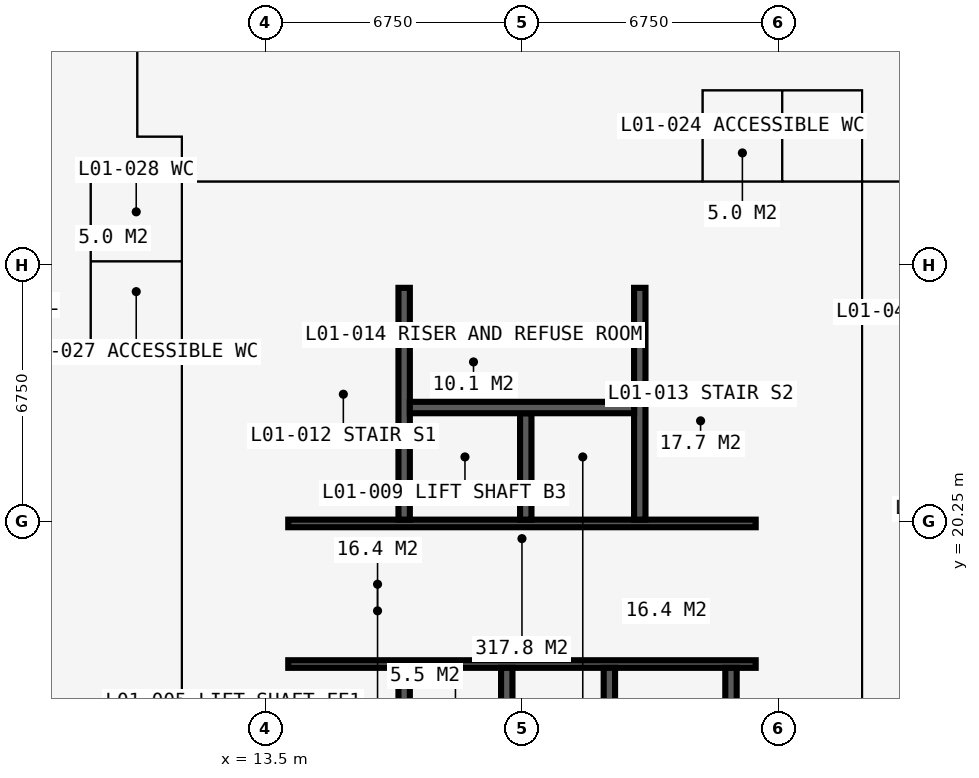
"""IFC4 building model, lengths in metres.
Left out: names, types, materials, properties, quantities, classifications, styles, units other than length and angle.
Written with IfcOpenShell. Run it as: python <this file> out.ifc"""

import sys

from ifc_helpers import new_model, si_unit, direction, frame, frame_2d, origin, place, context, subcontext, project, spatial, rectangle, extrude, element, fill, save


model = new_model("IFC4")
c1 = context("Model", 3, precision=1e-05, world=origin(), true_north=direction((0.0, 1.0)))
c2 = subcontext(c1, "Body", "Model", "MODEL_VIEW")
j1 = project(units=[si_unit("LENGTHUNIT", "METRE"), si_unit("PLANEANGLEUNIT", "RADIAN")], contexts=[c1])
p1 = place(None, origin())
s1 = spatial("IfcSite", under=j1, at=p1, CompositionType="ELEMENT")
p2 = place(p1, origin())
s2 = spatial("IfcBuilding", under=s1, at=p2, CompositionType="ELEMENT")
p3 = place(p2, frame((0.0, 0.0, 4.5)))
s3 = spatial("IfcBuildingStorey", under=s2, at=p3, CompositionType="ELEMENT", Elevation=4.5)
p4 = place(p3, frame((27.0, 14.1, 0.0), z_axis=(0.0, 0.0, 1.0), x_axis=(0.0, 1.0, 0.0)))
e1 = element("IfcWall", 1, at=p4, inside=s3, PredefinedType="SHEAR", context=c2, shape_type="SweptSolid", body=[
    extrude(rectangle(XDim=12.3, YDim=1.2, at=frame_2d((6.15, 0.0))), origin(), (0.0, 0.0, 1.0), 4.5),
])
p5 = place(p4, frame((3.65, 0.0, 0.0)))
e2 = element("IfcOpeningElement", 2, at=p5, cuts=e1, PredefinedType="OPENING", context=c2, shape_type="SweptSolid", body=[
    extrude(rectangle(XDim=1.2, YDim=2.2, at=frame_2d((0.6, 1.1))), frame((0.0, 0.61, 0.0), z_axis=(0.0, -1.0, 0.0), x_axis=(1.0, 0.0, 0.0)), (0.0, 0.0, 1.0), 1.22),
])
p6 = place(p3, frame((27.6, 27.0, 0.0), z_axis=(0.0, 0.0, 1.0), x_axis=(-1.0, 0.0, 0.0)))
e3 = element("IfcWall", 3, at=p6, inside=s3, PredefinedType="SHEAR", context=c2, shape_type="SweptSolid", body=[
    extrude(rectangle(XDim=14.7, YDim=1.2, at=frame_2d((7.35, 0.0))), origin(), (0.0, 0.0, 1.0), 4.5),
])
p7 = place(p6, frame((4.55, 0.0, 0.0)))
e4 = element("IfcOpeningElement", 4, at=p7, cuts=e3, PredefinedType="OPENING", context=c2, shape_type="SweptSolid", body=[
    extrude(rectangle(XDim=0.9, YDim=2.2, at=frame_2d((0.45, 1.1))), frame((0.0, 0.61, 0.0), z_axis=(0.0, -1.0, 0.0), x_axis=(1.0, 0.0, 0.0)), (0.0, 0.0, 1.0), 1.22),
])
p8 = place(p6, frame((7.525, 0.0, 0.0)))
e5 = element("IfcOpeningElement", 5, at=p8, cuts=e3, PredefinedType="OPENING", context=c2, shape_type="SweptSolid", body=[
    extrude(rectangle(XDim=1.0, YDim=2.2, at=frame_2d((0.5, 1.1))), frame((0.0, 0.61, 0.0), z_axis=(0.0, -1.0, 0.0), x_axis=(1.0, 0.0, 0.0)), (0.0, 0.0, 1.0), 1.22),
])
p9 = place(p3, frame((13.5, 26.4, 0.0), z_axis=(0.0, 0.0, 1.0), x_axis=(0.0, -1.0, 0.0)))
e6 = element("IfcWall", 6, at=p9, inside=s3, PredefinedType="SHEAR", context=c2, shape_type="SweptSolid", body=[
    extrude(rectangle(XDim=12.3, YDim=1.2, at=frame_2d((6.15, 0.0))), origin(), (0.0, 0.0, 1.0), 4.5),
])
p10 = place(p9, frame((7.45, 0.0, 0.0)))
e7 = element("IfcOpeningElement", 7, at=p10, cuts=e6, PredefinedType="OPENING", context=c2, shape_type="SweptSolid", body=[
    extrude(rectangle(XDim=1.2, YDim=2.2, at=frame_2d((0.6, 1.1))), frame((0.0, 0.61, 0.0), z_axis=(0.0, -1.0, 0.0), x_axis=(1.0, 0.0, 0.0)), (0.0, 0.0, 1.0), 1.22),
])
p11 = place(p3, frame((14.1, 16.5, 0.0), z_axis=(0.0, 0.0, 1.0), x_axis=(1.0, 0.0, 0.0)))
e8 = element("IfcWall", 8, at=p11, inside=s3, PredefinedType="SHEAR", context=c2, shape_type="SweptSolid", body=[
    extrude(rectangle(XDim=12.3, YDim=0.2, at=frame_2d((6.15, 0.0))), origin(), (0.0, 0.0, 1.0), 4.5),
])
p12 = place(p11, frame((0.9, 0.0, 0.0)))
e9 = element("IfcOpeningElement", 9, at=p12, cuts=e8, PredefinedType="OPENING", context=c2, shape_type="SweptSolid", body=[
    extrude(rectangle(XDim=1.1, YDim=2.2, at=frame_2d((0.55, 1.1))), frame((0.0, 0.11, 0.0), z_axis=(0.0, -1.0, 0.0), x_axis=(1.0, 0.0, 0.0)), (0.0, 0.0, 1.0), 0.22),
])
p13 = place(p11, frame((9.5, 0.0, 0.0)))
e10 = element("IfcOpeningElement", 10, at=p13, cuts=e8, PredefinedType="OPENING", context=c2, shape_type="SweptSolid", body=[
    extrude(rectangle(XDim=1.1, YDim=2.2, at=frame_2d((0.55, 1.1))), frame((0.0, 0.11, 0.0), z_axis=(0.0, -1.0, 0.0), x_axis=(1.0, 0.0, 0.0)), (0.0, 0.0, 1.0), 0.22),
])
p14 = place(p3, frame((14.1, 20.2, 0.0), z_axis=(0.0, 0.0, 1.0), x_axis=(1.0, 0.0, 0.0)))
e11 = element("IfcWall", 11, at=p14, inside=s3, PredefinedType="SHEAR", context=c2, shape_type="SweptSolid", body=[
    extrude(rectangle(XDim=12.3, YDim=0.2, at=frame_2d((6.15, 0.0))), origin(), (0.0, 0.0, 1.0), 4.5),
])
p15 = place(p14, frame((0.35, 0.0, 0.0)))
e12 = element("IfcOpeningElement", 12, at=p15, cuts=e11, PredefinedType="OPENING", context=c2, shape_type="SweptSolid", body=[
    extrude(rectangle(XDim=1.1, YDim=2.2, at=frame_2d((0.55, 1.1))), frame((0.0, 0.11, 0.0), z_axis=(0.0, -1.0, 0.0), x_axis=(1.0, 0.0, 0.0)), (0.0, 0.0, 1.0), 0.22),
])
p16 = place(p14, frame((9.75, 0.0, 0.0)))
e13 = element("IfcOpeningElement", 13, at=p16, cuts=e11, PredefinedType="OPENING", context=c2, shape_type="SweptSolid", body=[
    extrude(rectangle(XDim=1.1, YDim=2.2, at=frame_2d((0.55, 1.1))), frame((0.0, 0.11, 0.0), z_axis=(0.0, -1.0, 0.0), x_axis=(1.0, 0.0, 0.0)), (0.0, 0.0, 1.0), 0.22),
])
for number, where, z_axis, x_axis in (
    (14, (17.15, 20.3, 0.0), (0.0, 0.0, 1.0), (0.0, 1.0, 0.0)),
    (15, (23.35, 20.3, 0.0), (0.0, 0.0, 1.0), (0.0, 1.0, 0.0)),
):
    element("IfcWall", number, at=place(p3, frame(where, z_axis=z_axis, x_axis=x_axis)), inside=s3, PredefinedType="SHEAR", context=c2, shape_type="SweptSolid", body=[
        extrude(rectangle(XDim=6.1, YDim=0.3, at=frame_2d((3.05, 0.0))), origin(), (0.0, 0.0, 1.0), 4.5),
    ])
p17 = place(p3, frame((20.35, 20.3, 0.0), z_axis=(0.0, 0.0, 1.0), x_axis=(0.0, 1.0, 0.0)))
e16 = element("IfcWall", 16, at=p17, inside=s3, PredefinedType="SHEAR", context=c2, shape_type="SweptSolid", body=[
    extrude(rectangle(XDim=2.8, YDim=0.3, at=frame_2d((1.4, 0.0))), origin(), (0.0, 0.0, 1.0), 4.5),
])
p18 = place(p3, frame((17.3, 23.25, 0.0), z_axis=(0.0, 0.0, 1.0), x_axis=(1.0, 0.0, 0.0)))
e17 = element("IfcWall", 17, at=p18, inside=s3, PredefinedType="SHEAR", context=c2, shape_type="SweptSolid", body=[
    extrude(rectangle(XDim=5.9, YDim=0.3, at=frame_2d((2.95, 0.0))), origin(), (0.0, 0.0, 1.0), 4.5),
])
for number, where, z_axis, x_axis in (
    (18, (17.15, 14.1, 0.0), (0.0, 0.0, 1.0), (0.0, 1.0, 0.0)),
    (19, (19.85, 14.1, 0.0), (0.0, 0.0, 1.0), (0.0, 1.0, 0.0)),
    (20, (22.55, 14.1, 0.0), (0.0, 0.0, 1.0), (0.0, 1.0, 0.0)),
    (21, (25.75, 14.1, 0.0), (0.0, 0.0, 1.0), (0.0, 1.0, 0.0)),
):
    element("IfcWall", number, at=place(p3, frame(where, z_axis=z_axis, x_axis=x_axis)), inside=s3, PredefinedType="SHEAR", context=c2, shape_type="SweptSolid", body=[
        extrude(rectangle(XDim=2.3, YDim=0.3, at=frame_2d((1.15, 0.0))), origin(), (0.0, 0.0, 1.0), 4.5),
    ])
p19 = place(p3, frame((18.875, 16.6, 0.0), z_axis=(0.0, 0.0, 1.0), x_axis=(0.0, 1.0, 0.0)))
e22 = element("IfcWall", 22, at=p19, inside=s3, PredefinedType="PARTITIONING", context=c2, shape_type="SweptSolid", body=[
    extrude(rectangle(XDim=3.5, YDim=0.15, at=frame_2d((1.75, 0.0))), origin(), (0.0, 0.0, 1.0), 4.25),
])
p20 = place(p19, frame((1.15, 0.0, 0.0)))
e23 = element("IfcOpeningElement", 23, at=p20, cuts=e22, PredefinedType="OPENING", context=c2, shape_type="SweptSolid", body=[
    extrude(rectangle(XDim=1.2, YDim=2.2, at=frame_2d((0.6, 1.1))), frame((0.0, 0.085, 0.0), z_axis=(0.0, -1.0, 0.0), x_axis=(1.0, 0.0, 0.0)), (0.0, 0.0, 1.0), 0.17),
])
p21 = place(p3, frame((21.625, 16.6, 0.0), z_axis=(0.0, 0.0, 1.0), x_axis=(0.0, 1.0, 0.0)))
e24 = element("IfcWall", 24, at=p21, inside=s3, PredefinedType="PARTITIONING", context=c2, shape_type="SweptSolid", body=[
    extrude(rectangle(XDim=3.5, YDim=0.15, at=frame_2d((1.75, 0.0))), origin(), (0.0, 0.0, 1.0), 4.25),
])
p22 = place(p21, frame((1.15, 0.0, 0.0)))
e25 = element("IfcOpeningElement", 25, at=p22, cuts=e24, PredefinedType="OPENING", context=c2, shape_type="SweptSolid", body=[
    extrude(rectangle(XDim=1.2, YDim=2.2, at=frame_2d((0.6, 1.1))), frame((0.0, 0.085, 0.0), z_axis=(0.0, -1.0, 0.0), x_axis=(1.0, 0.0, 0.0)), (0.0, 0.0, 1.0), 0.17),
])
p23 = place(p3, frame((20.12, 16.6, 0.0), z_axis=(0.0, 0.0, 1.0), x_axis=(0.0, 1.0, 0.0)))
e26 = element("IfcWall", 26, at=p23, inside=s3, PredefinedType="PARTITIONING", context=c2, shape_type="SweptSolid", body=[
    extrude(rectangle(XDim=3.5, YDim=0.15, at=frame_2d((1.75, 0.0))), origin(), (0.0, 0.0, 1.0), 4.25),
])
p24 = place(p3, frame((20.725, 23.4, 0.0), z_axis=(0.0, 0.0, 1.0), x_axis=(0.0, 1.0, 0.0)))
e27 = element("IfcWall", 27, at=p24, inside=s3, PredefinedType="PARTITIONING", context=c2, shape_type="SweptSolid", body=[
    extrude(rectangle(XDim=3.0, YDim=0.15, at=frame_2d((1.5, 0.0))), origin(), (0.0, 0.0, 1.0), 4.25),
])
p25 = place(p3, frame((8.9, 25.0, 0.0), z_axis=(0.0, 0.0, 1.0), x_axis=(0.0, 1.0, 0.0)))
e28 = element("IfcWall", 28, at=p25, inside=s3, PredefinedType="PARTITIONING", context=c2, shape_type="SweptSolid", body=[
    extrude(rectangle(XDim=4.2, YDim=0.15, at=frame_2d((2.1, 0.0))), origin(), (0.0, 0.0, 1.0), 4.25),
])
p26 = place(p3, frame((8.9, 25.0, 0.0), z_axis=(0.0, 0.0, 1.0), x_axis=(1.0, 0.0, 0.0)))
e29 = element("IfcWall", 29, at=p26, inside=s3, PredefinedType="PARTITIONING", context=c2, shape_type="SweptSolid", body=[
    extrude(rectangle(XDim=2.4, YDim=0.1, at=frame_2d((1.2, 0.0))), origin(), (0.0, 0.0, 1.0), 4.25),
])
p27 = place(p3, frame((8.9, 27.1, 0.0), z_axis=(0.0, 0.0, 1.0), x_axis=(1.0, 0.0, 0.0)))
e30 = element("IfcWall", 30, at=p27, inside=s3, PredefinedType="PARTITIONING", context=c2, shape_type="SweptSolid", body=[
    extrude(rectangle(XDim=2.4, YDim=0.1, at=frame_2d((1.2, 0.0))), origin(), (0.0, 0.0, 1.0), 3.752),
])
p28 = place(p3, frame((8.9, 29.2, 0.0), z_axis=(0.0, 0.0, 1.0), x_axis=(1.0, 0.0, 0.0)))
e31 = element("IfcWall", 31, at=p28, inside=s3, PredefinedType="PARTITIONING", context=c2, shape_type="SweptSolid", body=[
    extrude(rectangle(XDim=21.475, YDim=0.15, at=frame_2d((10.738, 0.0))), origin(), (0.0, 0.0, 1.0), 4.25),
])
p29 = place(p28, frame((16.65, 0.0, 0.0)))
e32 = element("IfcOpeningElement", 32, at=p29, cuts=e31, PredefinedType="OPENING", context=c2, shape_type="SweptSolid", body=[
    extrude(rectangle(XDim=1.0, YDim=2.2, at=frame_2d((0.5, 1.1))), frame((0.0, 0.085, 0.0), z_axis=(0.0, -1.0, 0.0), x_axis=(1.0, 0.0, 0.0)), (0.0, 0.0, 1.0), 0.17),
])
p30 = place(p28, frame((18.75, 0.0, 0.0)))
e33 = element("IfcOpeningElement", 33, at=p30, cuts=e31, PredefinedType="OPENING", context=c2, shape_type="SweptSolid", body=[
    extrude(rectangle(XDim=1.0, YDim=2.2, at=frame_2d((0.5, 1.1))), frame((0.0, 0.085, 0.0), z_axis=(0.0, -1.0, 0.0), x_axis=(1.0, 0.0, 0.0)), (0.0, 0.0, 1.0), 0.17),
])
p31 = place(p28, frame((8.45, 0.0, 0.0)))
e34 = element("IfcOpeningElement", 34, at=p31, cuts=e31, PredefinedType="OPENING", context=c2, shape_type="SweptSolid", body=[
    extrude(rectangle(XDim=1.6, YDim=2.4, at=frame_2d((0.8, 1.2))), frame((0.0, 0.085, 0.0), z_axis=(0.0, -1.0, 0.0), x_axis=(1.0, 0.0, 0.0)), (0.0, 0.0, 1.0), 0.17),
])
p32 = place(p3, frame((10.125, 30.375, 0.0), z_axis=(0.0, 0.0, 1.0), x_axis=(0.0, 1.0, 0.0)))
e35 = element("IfcWall", 35, at=p32, inside=s3, PredefinedType="PARTITIONING", context=c2, shape_type="SweptSolid", body=[
    extrude(rectangle(XDim=10.859, YDim=0.15, at=frame_2d((5.429, 0.0))), origin(), (0.0, 0.0, 1.0), 4.25),
])
p33 = place(p3, frame((10.125, 30.375, 0.0), z_axis=(0.0, 0.0, 1.0), x_axis=(1.0, 0.0, 0.0)))
e36 = element("IfcWall", 36, at=p33, inside=s3, PredefinedType="PARTITIONING", context=c2, shape_type="SweptSolid", body=[
    extrude(rectangle(XDim=1.175, YDim=0.15, at=frame_2d((0.587, 0.0))), origin(), (0.0, 0.0, 1.0), 4.25),
])
p34 = place(p3, frame((11.3, 8.9, 0.0), z_axis=(0.0, 0.0, 1.0), x_axis=(0.0, 1.0, 0.0)))
e37 = element("IfcWall", 37, at=p34, inside=s3, PredefinedType="PARTITIONING", context=c2, shape_type="SweptSolid", body=[
    extrude(rectangle(XDim=21.475, YDim=0.15, at=frame_2d((10.738, 0.0))), origin(), (0.0, 0.0, 1.0), 4.25),
])
p35 = place(p34, frame((16.65, 0.0, 0.0)))
e38 = element("IfcOpeningElement", 38, at=p35, cuts=e37, PredefinedType="OPENING", context=c2, shape_type="SweptSolid", body=[
    extrude(rectangle(XDim=1.0, YDim=2.2, at=frame_2d((0.5, 1.1))), frame((0.0, 0.085, 0.0), z_axis=(0.0, -1.0, 0.0), x_axis=(1.0, 0.0, 0.0)), (0.0, 0.0, 1.0), 0.17),
])
p36 = place(p34, frame((18.75, 0.0, 0.0)))
e39 = element("IfcOpeningElement", 39, at=p36, cuts=e37, PredefinedType="OPENING", context=c2, shape_type="SweptSolid", body=[
    extrude(rectangle(XDim=1.0, YDim=2.2, at=frame_2d((0.5, 1.1))), frame((0.0, 0.085, 0.0), z_axis=(0.0, -1.0, 0.0), x_axis=(1.0, 0.0, 0.0)), (0.0, 0.0, 1.0), 0.17),
])
p37 = place(p34, frame((8.45, 0.0, 0.0)))
e40 = element("IfcOpeningElement", 40, at=p37, cuts=e37, PredefinedType="OPENING", context=c2, shape_type="SweptSolid", body=[
    extrude(rectangle(XDim=1.6, YDim=2.4, at=frame_2d((0.8, 1.2))), frame((0.0, 0.085, 0.0), z_axis=(0.0, -1.0, 0.0), x_axis=(1.0, 0.0, 0.0)), (0.0, 0.0, 1.0), 0.17),
])
p38 = place(p3, frame((25.0, 29.2, 0.0), z_axis=(0.0, 0.0, 1.0), x_axis=(0.0, 1.0, 0.0)))
e41 = element("IfcWall", 41, at=p38, inside=s3, PredefinedType="PARTITIONING", context=c2, shape_type="SweptSolid", body=[
    extrude(rectangle(XDim=2.4, YDim=0.1, at=frame_2d((1.2, 0.0))), origin(), (0.0, 0.0, 1.0), 4.25),
])
p39 = place(p3, frame((25.0, 31.6, 0.0), z_axis=(0.0, 0.0, 1.0), x_axis=(1.0, 0.0, 0.0)))
e42 = element("IfcWall", 42, at=p39, inside=s3, PredefinedType="PARTITIONING", context=c2, shape_type="SweptSolid", body=[
    extrude(rectangle(XDim=4.2, YDim=0.15, at=frame_2d((2.1, 0.0))), origin(), (0.0, 0.0, 1.0), 4.25),
])
p40 = place(p3, frame((27.1, 29.2, 0.0), z_axis=(0.0, 0.0, 1.0), x_axis=(0.0, 1.0, 0.0)))
e43 = element("IfcWall", 43, at=p40, inside=s3, PredefinedType="PARTITIONING", context=c2, shape_type="SweptSolid", body=[
    extrude(rectangle(XDim=2.4, YDim=0.1, at=frame_2d((1.2, 0.0))), origin(), (0.0, 0.0, 1.0), 3.752),
])
p41 = place(p3, frame((29.2, 11.3, 0.0), z_axis=(0.0, 0.0, 1.0), x_axis=(0.0, 1.0, 0.0)))
e44 = element("IfcWall", 44, at=p41, inside=s3, PredefinedType="PARTITIONING", context=c2, shape_type="SweptSolid", body=[
    extrude(rectangle(XDim=20.3, YDim=0.15, at=frame_2d((10.15, 0.0))), origin(), (0.0, 0.0, 1.0), 4.25),
])
p42 = place(p41, frame((15.35, 0.0, 0.0)))
e45 = element("IfcOpeningElement", 45, at=p42, cuts=e44, PredefinedType="OPENING", context=c2, shape_type="SweptSolid", body=[
    extrude(rectangle(XDim=1.6, YDim=2.4, at=frame_2d((0.8, 1.2))), frame((0.0, 0.085, 0.0), z_axis=(0.0, -1.0, 0.0), x_axis=(1.0, 0.0, 0.0)), (0.0, 0.0, 1.0), 0.17),
])
p43 = place(p41, frame((8.35, 0.0, 0.0)))
e46 = element("IfcOpeningElement", 46, at=p43, cuts=e44, PredefinedType="OPENING", context=c2, shape_type="SweptSolid", body=[
    extrude(rectangle(XDim=1.2, YDim=2.2, at=frame_2d((0.6, 1.1))), frame((0.0, 0.085, 0.0), z_axis=(0.0, -1.0, 0.0), x_axis=(1.0, 0.0, 0.0)), (0.0, 0.0, 1.0), 0.17),
])
p44 = place(p3, frame((29.2, 25.7, 0.0), z_axis=(0.0, 0.0, 1.0), x_axis=(1.0, 0.0, 0.0)))
e47 = element("IfcWall", 47, at=p44, inside=s3, PredefinedType="SHEAR", context=c2, shape_type="SweptSolid", body=[
    extrude(rectangle(XDim=3.45, YDim=0.1, at=frame_2d((1.725, 0.0))), origin(), (0.0, 0.0, 1.0), 4.25),
])
p45 = place(p12, origin())
e48 = element("IfcDoor", 48, at=p45, inside=s3, OperationType="DOUBLE_DOOR_SLIDING", PredefinedType="DOOR", context=c2, shape_type="SweptSolid", body=[
    extrude(rectangle(XDim=1.1, YDim=2.2, at=frame_2d((0.55, 1.1))), frame((0.0, 0.025, 0.0), z_axis=(0.0, -1.0, 0.0), x_axis=(1.0, 0.0, 0.0)), (0.0, 0.0, 1.0), 0.05),
])
fill(e9, e48)
p46 = place(p13, origin())
e49 = element("IfcDoor", 49, at=p46, inside=s3, OperationType="DOUBLE_DOOR_SLIDING", PredefinedType="DOOR", context=c2, shape_type="SweptSolid", body=[
    extrude(rectangle(XDim=1.1, YDim=2.2, at=frame_2d((0.55, 1.1))), frame((0.0, 0.025, 0.0), z_axis=(0.0, -1.0, 0.0), x_axis=(1.0, 0.0, 0.0)), (0.0, 0.0, 1.0), 0.05),
])
fill(e10, e49)
p47 = place(p10, origin())
e50 = element("IfcDoor", 50, at=p47, inside=s3, OperationType="DOUBLE_DOOR_SINGLE_SWING", PredefinedType="DOOR", context=c2, shape_type="SweptSolid", body=[
    extrude(rectangle(XDim=1.2, YDim=2.2, at=frame_2d((0.6, 1.1))), frame((0.0, 0.025, 0.0), z_axis=(0.0, -1.0, 0.0), x_axis=(1.0, 0.0, 0.0)), (0.0, 0.0, 1.0), 0.05),
])
fill(e7, e50)
p48 = place(p5, origin())
e51 = element("IfcDoor", 51, at=p48, inside=s3, OperationType="DOUBLE_DOOR_SINGLE_SWING", PredefinedType="DOOR", context=c2, shape_type="SweptSolid", body=[
    extrude(rectangle(XDim=1.2, YDim=2.2, at=frame_2d((0.6, 1.1))), frame((0.0, 0.025, 0.0), z_axis=(0.0, -1.0, 0.0), x_axis=(1.0, 0.0, 0.0)), (0.0, 0.0, 1.0), 0.05),
])
fill(e2, e51)
p49 = place(p20, origin())
e52 = element("IfcDoor", 52, at=p49, inside=s3, OperationType="DOUBLE_DOOR_SINGLE_SWING", PredefinedType="DOOR", context=c2, shape_type="SweptSolid", body=[
    extrude(rectangle(XDim=1.2, YDim=2.2, at=frame_2d((0.6, 1.1))), frame((0.0, 0.025, 0.0), z_axis=(0.0, -1.0, 0.0), x_axis=(1.0, 0.0, 0.0)), (0.0, 0.0, 1.0), 0.05),
])
fill(e23, e52)
p50 = place(p22, origin())
e53 = element("IfcDoor", 53, at=p50, inside=s3, OperationType="DOUBLE_DOOR_SINGLE_SWING", PredefinedType="DOOR", context=c2, shape_type="SweptSolid", body=[
    extrude(rectangle(XDim=1.2, YDim=2.2, at=frame_2d((0.6, 1.1))), frame((0.0, 0.025, 0.0), z_axis=(0.0, -1.0, 0.0), x_axis=(1.0, 0.0, 0.0)), (0.0, 0.0, 1.0), 0.05),
])
fill(e25, e53)
p51 = place(p7, origin())
e54 = element("IfcDoor", 54, at=p51, inside=s3, OperationType="SINGLE_SWING_LEFT", PredefinedType="DOOR", context=c2, shape_type="SweptSolid", body=[
    extrude(rectangle(XDim=0.9, YDim=2.2, at=frame_2d((0.45, 1.1))), frame((0.0, 0.4, 0.0), z_axis=(0.0, -1.0, 0.0), x_axis=(1.0, 0.0, 0.0)), (0.0, 0.0, 1.0), 0.8),
])
fill(e4, e54)
p52 = place(p8, origin())
e55 = element("IfcDoor", 55, at=p52, inside=s3, OperationType="SINGLE_SWING_LEFT", PredefinedType="DOOR", context=c2, shape_type="SweptSolid", body=[
    extrude(rectangle(XDim=1.0, YDim=2.2, at=frame_2d((0.5, 1.1))), frame((0.0, 0.025, 0.0), z_axis=(0.0, -1.0, 0.0), x_axis=(1.0, 0.0, 0.0)), (0.0, 0.0, 1.0), 0.05),
])
fill(e5, e55)
p53 = place(p15, origin())
e56 = element("IfcDoor", 56, at=p53, inside=s3, OperationType="SINGLE_SWING_LEFT", PredefinedType="DOOR", context=c2, shape_type="SweptSolid", body=[
    extrude(rectangle(XDim=1.1, YDim=2.2, at=frame_2d((0.55, 1.1))), frame((0.0, 0.025, 0.0), z_axis=(0.0, -1.0, 0.0), x_axis=(1.0, 0.0, 0.0)), (0.0, 0.0, 1.0), 0.05),
])
fill(e12, e56)
p54 = place(p16, origin())
e57 = element("IfcDoor", 57, at=p54, inside=s3, OperationType="SINGLE_SWING_LEFT", PredefinedType="DOOR", context=c2, shape_type="SweptSolid", body=[
    extrude(rectangle(XDim=1.1, YDim=2.2, at=frame_2d((0.55, 1.1))), frame((0.0, 0.025, 0.0), z_axis=(0.0, -1.0, 0.0), x_axis=(1.0, 0.0, 0.0)), (0.0, 0.0, 1.0), 0.05),
])
fill(e13, e57)
p55 = place(p42, origin())
e58 = element("IfcDoor", 58, at=p55, inside=s3, OperationType="DOUBLE_DOOR_SINGLE_SWING", PredefinedType="DOOR", context=c2, shape_type="SweptSolid", body=[
    extrude(rectangle(XDim=1.6, YDim=2.4, at=frame_2d((0.8, 1.2))), frame((0.0, 0.025, 0.0), z_axis=(0.0, -1.0, 0.0), x_axis=(1.0, 0.0, 0.0)), (0.0, 0.0, 1.0), 0.05),
])
fill(e45, e58)
p56 = place(p29, origin())
e59 = element("IfcDoor", 59, at=p56, inside=s3, OperationType="SINGLE_SWING_LEFT", PredefinedType="DOOR", context=c2, shape_type="SweptSolid", body=[
    extrude(rectangle(XDim=1.0, YDim=2.2, at=frame_2d((0.5, 1.1))), frame((0.0, 0.025, 0.0), z_axis=(0.0, -1.0, 0.0), x_axis=(1.0, 0.0, 0.0)), (0.0, 0.0, 1.0), 0.05),
])
fill(e32, e59)
p57 = place(p30, origin())
e60 = element("IfcDoor", 60, at=p57, inside=s3, OperationType="SINGLE_SWING_LEFT", PredefinedType="DOOR", context=c2, shape_type="SweptSolid", body=[
    extrude(rectangle(XDim=1.0, YDim=2.2, at=frame_2d((0.5, 1.1))), frame((0.0, 0.025, 0.0), z_axis=(0.0, -1.0, 0.0), x_axis=(1.0, 0.0, 0.0)), (0.0, 0.0, 1.0), 0.05),
])
fill(e33, e60)
p58 = place(p31, origin())
e61 = element("IfcDoor", 61, at=p58, inside=s3, OperationType="DOUBLE_DOOR_SINGLE_SWING", PredefinedType="DOOR", context=c2, shape_type="SweptSolid", body=[
    extrude(rectangle(XDim=1.6, YDim=2.4, at=frame_2d((0.8, 1.2))), frame((0.0, 0.025, 0.0), z_axis=(0.0, -1.0, 0.0), x_axis=(1.0, 0.0, 0.0)), (0.0, 0.0, 1.0), 0.05),
])
fill(e34, e61)
p59 = place(p35, origin())
e62 = element("IfcDoor", 62, at=p59, inside=s3, OperationType="SINGLE_SWING_LEFT", PredefinedType="DOOR", context=c2, shape_type="SweptSolid", body=[
    extrude(rectangle(XDim=1.0, YDim=2.2, at=frame_2d((0.5, 1.1))), frame((0.0, 0.025, 0.0), z_axis=(0.0, -1.0, 0.0), x_axis=(1.0, 0.0, 0.0)), (0.0, 0.0, 1.0), 0.05),
])
fill(e38, e62)
p60 = place(p36, origin())
e63 = element("IfcDoor", 63, at=p60, inside=s3, OperationType="SINGLE_SWING_LEFT", PredefinedType="DOOR", context=c2, shape_type="SweptSolid", body=[
    extrude(rectangle(XDim=1.0, YDim=2.2, at=frame_2d((0.5, 1.1))), frame((0.0, 0.025, 0.0), z_axis=(0.0, -1.0, 0.0), x_axis=(1.0, 0.0, 0.0)), (0.0, 0.0, 1.0), 0.05),
])
fill(e39, e63)
p61 = place(p37, origin())
e64 = element("IfcDoor", 64, at=p61, inside=s3, OperationType="DOUBLE_DOOR_SINGLE_SWING", PredefinedType="DOOR", context=c2, shape_type="SweptSolid", body=[
    extrude(rectangle(XDim=1.6, YDim=2.4, at=frame_2d((0.8, 1.2))), frame((0.0, 0.025, 0.0), z_axis=(0.0, -1.0, 0.0), x_axis=(1.0, 0.0, 0.0)), (0.0, 0.0, 1.0), 0.05),
])
fill(e40, e64)
p62 = place(p43, origin())
e65 = element("IfcDoor", 65, at=p62, inside=s3, OperationType="DOUBLE_DOOR_SINGLE_SWING", PredefinedType="DOOR", context=c2, shape_type="SweptSolid", body=[
    extrude(rectangle(XDim=1.2, YDim=2.2, at=frame_2d((0.6, 1.1))), frame((0.0, 0.025, 0.0), z_axis=(0.0, -1.0, 0.0), x_axis=(1.0, 0.0, 0.0)), (0.0, 0.0, 1.0), 0.05),
])
fill(e46, e65)
save(model, sys.argv[1])
